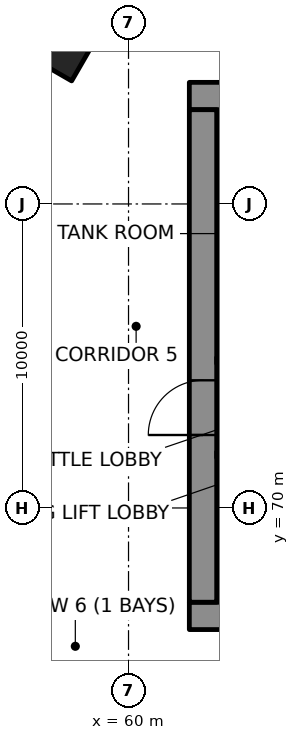
"""IFC4 building model, lengths in metres.
Left out: names, types, materials, properties, quantities, classifications, styles, units other than length and angle.
Written with IfcOpenShell. Run it as: python <this file> out.ifc"""

import sys

from ifc_helpers import new_model, si_unit, direction, frame, frame_2d, origin, origin_2d, place, context, subcontext, project, spatial, polyline, rectangle, outline, extrude, element, fill, save


model = new_model("IFC4")
c1 = context("Model", 3, precision=1e-05, world=origin(), true_north=direction((0.0, 1.0)))
c2 = subcontext(c1, "Body", "Model", "MODEL_VIEW")
j1 = project(units=[si_unit("LENGTHUNIT", "METRE"), si_unit("PLANEANGLEUNIT", "RADIAN")], contexts=[c1])
p1 = place(None, origin())
s1 = spatial("IfcSite", under=j1, at=p1, CompositionType="ELEMENT")
p2 = place(p1, origin())
s2 = spatial("IfcBuilding", under=s1, at=p2, CompositionType="ELEMENT")
p3 = place(p2, frame((0.0, 0.0, -14.0)))
s3 = spatial("IfcBuildingStorey", under=s2, at=p3, CompositionType="ELEMENT", Elevation=-14.0)
p4 = place(p3, frame((67.936, 110.334, -0.35), z_axis=(0.0, 0.0, 1.0), x_axis=(-0.499999089162, -0.866025929656, 0.0)))
e1 = element("IfcWall", 1, at=p4, inside=s3, PredefinedType="SOLIDWALL", context=c2, shape_type="SweptSolid", body=[
    extrude(rectangle(XDim=53.501, YDim=0.6, at=frame_2d((26.751, 0.0))), origin(), (0.0, 0.0, 1.0), 4.5),
])
p5 = place(p3, frame((0.0, 0.0, -14.5)))
e2 = element("IfcWall", 2, at=p5, inside=s3, PredefinedType="SOLIDWALL", context=c2, shape_type="SweptSolid", body=[
    extrude(outline(polyline([(67.936, 110.334), (41.185, 64.0), (40.723, 64.8), (67.474, 111.134), (67.936, 110.334)])), origin(), (0.0, 0.0, 1.0), 14.15),
])
p6 = place(p3, frame((57.78, 84.942, -0.35), z_axis=(0.0, 0.0, 1.0), x_axis=(-0.5, -0.866025403784, 0.0)))
e3 = element("IfcColumn", 3, at=p6, inside=s3, PredefinedType="COLUMN", context=c2, shape_type="SweptSolid", body=[
    extrude(rectangle(XDim=1.2, YDim=1.5, at=origin_2d()), origin(), (0.0, 0.0, 1.0), 4.85),
])
p7 = place(p3, frame((62.0, 66.45, -0.35), z_axis=(0.0, 0.0, 1.0), x_axis=(1.0, 0.0, 0.0)))
e4 = element("IfcWall", 4, at=p7, inside=s3, PredefinedType="SHEAR", context=c2, shape_type="SweptSolid", body=[
    extrude(rectangle(XDim=26.0, YDim=0.9, at=frame_2d((13.0, 0.0))), origin(), (0.0, 0.0, 1.0), 4.5),
])
p8 = place(p7, frame((3.45, 0.0, 0.35)))
e5 = element("IfcOpeningElement", 5, at=p8, cuts=e4, PredefinedType="OPENING", context=c2, shape_type="SweptSolid", body=[
    extrude(rectangle(XDim=0.9, YDim=2.1, at=frame_2d((0.45, 1.05))), frame((0.0, 0.46, 0.0), z_axis=(0.0, -1.0, 0.0), x_axis=(1.0, 0.0, 0.0)), (0.0, 0.0, 1.0), 0.92),
])
p9 = place(p7, frame((5.637, 0.0, 0.35)))
e6 = element("IfcOpeningElement", 6, at=p9, cuts=e4, PredefinedType="OPENING", context=c2, shape_type="SweptSolid", body=[
    extrude(rectangle(XDim=0.9, YDim=2.1, at=frame_2d((0.45, 1.05))), frame((0.0, 0.46, 0.0), z_axis=(0.0, -1.0, 0.0), x_axis=(1.0, 0.0, 0.0)), (0.0, 0.0, 1.0), 0.92),
])
p10 = place(p7, frame((7.212, 0.0, 0.35)))
e7 = element("IfcOpeningElement", 7, at=p10, cuts=e4, PredefinedType="OPENING", context=c2, shape_type="SweptSolid", body=[
    extrude(rectangle(XDim=0.9, YDim=2.1, at=frame_2d((0.45, 1.05))), frame((0.0, 0.46, 0.0), z_axis=(0.0, -1.0, 0.0), x_axis=(1.0, 0.0, 0.0)), (0.0, 0.0, 1.0), 0.92),
])
p11 = place(p7, frame((8.999, 0.0, 0.35)))
e8 = element("IfcOpeningElement", 8, at=p11, cuts=e4, PredefinedType="OPENING", context=c2, shape_type="SweptSolid", body=[
    extrude(rectangle(XDim=0.9, YDim=2.1, at=frame_2d((0.45, 1.05))), frame((0.0, 0.46, 0.0), z_axis=(0.0, -1.0, 0.0), x_axis=(1.0, 0.0, 0.0)), (0.0, 0.0, 1.0), 0.92),
])
p12 = place(p7, frame((17.324, 0.0, 0.35)))
e9 = element("IfcOpeningElement", 9, at=p12, cuts=e4, PredefinedType="OPENING", context=c2, shape_type="SweptSolid", body=[
    extrude(rectangle(XDim=0.9, YDim=2.1, at=frame_2d((0.45, 1.05))), frame((0.0, 0.46, 0.0), z_axis=(0.0, -1.0, 0.0), x_axis=(1.0, 0.0, 0.0)), (0.0, 0.0, 1.0), 0.92),
])
p13 = place(p3, frame((62.0, 83.55, -0.35), z_axis=(0.0, 0.0, 1.0), x_axis=(1.0, 0.0, 0.0)))
e10 = element("IfcWall", 10, at=p13, inside=s3, PredefinedType="SHEAR", context=c2, shape_type="SweptSolid", body=[
    extrude(rectangle(XDim=26.0, YDim=0.9, at=frame_2d((13.0, 0.0))), origin(), (0.0, 0.0, 1.0), 4.5),
])
p14 = place(p13, frame((5.695, 0.0, 0.35)))
e11 = element("IfcOpeningElement", 11, at=p14, cuts=e10, PredefinedType="OPENING", context=c2, shape_type="SweptSolid", body=[
    extrude(rectangle(XDim=1.0, YDim=2.1, at=frame_2d((0.5, 1.05))), frame((0.0, 0.46, 0.0), z_axis=(0.0, -1.0, 0.0), x_axis=(1.0, 0.0, 0.0)), (0.0, 0.0, 1.0), 0.92),
])
p15 = place(p13, frame((19.505, 0.0, 0.35)))
e12 = element("IfcOpeningElement", 12, at=p15, cuts=e10, PredefinedType="OPENING", context=c2, shape_type="SweptSolid", body=[
    extrude(rectangle(XDim=1.0, YDim=2.1, at=frame_2d((0.5, 1.05))), frame((0.0, 0.46, 0.0), z_axis=(0.0, -1.0, 0.0), x_axis=(1.0, 0.0, 0.0)), (0.0, 0.0, 1.0), 0.92),
])
p16 = place(p13, frame((3.45, 0.0, 0.35)))
e13 = element("IfcOpeningElement", 13, at=p16, cuts=e10, PredefinedType="OPENING", context=c2, shape_type="SweptSolid", body=[
    extrude(rectangle(XDim=0.9, YDim=2.1, at=frame_2d((0.45, 1.05))), frame((0.0, 0.46, 0.0), z_axis=(0.0, -1.0, 0.0), x_axis=(1.0, 0.0, 0.0)), (0.0, 0.0, 1.0), 0.92),
])
p17 = place(p13, frame((12.65, 0.0, 0.35)))
e14 = element("IfcOpeningElement", 14, at=p17, cuts=e10, PredefinedType="OPENING", context=c2, shape_type="SweptSolid", body=[
    extrude(rectangle(XDim=0.9, YDim=2.1, at=frame_2d((0.45, 1.05))), frame((0.0, 0.46, 0.0), z_axis=(0.0, -1.0, 0.0), x_axis=(1.0, 0.0, 0.0)), (0.0, 0.0, 1.0), 0.92),
])
p18 = place(p13, frame((22.55, 0.0, 0.35)))
e15 = element("IfcOpeningElement", 15, at=p18, cuts=e10, PredefinedType="OPENING", context=c2, shape_type="SweptSolid", body=[
    extrude(rectangle(XDim=0.9, YDim=2.1, at=frame_2d((0.45, 1.05))), frame((0.0, 0.46, 0.0), z_axis=(0.0, -1.0, 0.0), x_axis=(1.0, 0.0, 0.0)), (0.0, 0.0, 1.0), 0.92),
])
p19 = place(p3, frame((62.45, 66.9, -0.35), z_axis=(0.0, 0.0, 1.0), x_axis=(0.0, 1.0, 0.0)))
e16 = element("IfcWall", 16, at=p19, inside=s3, PredefinedType="SHEAR", context=c2, shape_type="SweptSolid", body=[
    extrude(rectangle(XDim=16.2, YDim=0.9, at=frame_2d((8.1, 0.0))), origin(), (0.0, 0.0, 1.0), 4.5),
])
p20 = place(p19, frame((5.5, 0.0, 0.35)))
e17 = element("IfcOpeningElement", 17, at=p20, cuts=e16, PredefinedType="OPENING", context=c2, shape_type="SweptSolid", body=[
    extrude(rectangle(XDim=1.8, YDim=2.1, at=frame_2d((0.9, 1.05))), frame((0.0, 0.46, 0.0), z_axis=(0.0, -1.0, 0.0), x_axis=(1.0, 0.0, 0.0)), (0.0, 0.0, 1.0), 0.92),
])
p21 = place(p3, frame((62.9, 71.75, 0.0), z_axis=(0.0, 0.0, 1.0), x_axis=(1.0, 0.0, 0.0)))
e18 = element("IfcWall", 18, at=p21, inside=s3, PredefinedType="PARTITIONING", context=c2, shape_type="SweptSolid", body=[
    extrude(rectangle(XDim=7.4, YDim=0.2, at=frame_2d((3.7, 0.0))), origin(), (0.0, 0.0, 1.0), 4.15),
])
p22 = place(p3, frame((62.9, 74.85, 0.0), z_axis=(0.0, 0.0, 1.0), x_axis=(1.0, 0.0, 0.0)))
e19 = element("IfcWall", 19, at=p22, inside=s3, PredefinedType="PARTITIONING", context=c2, shape_type="SweptSolid", body=[
    extrude(rectangle(XDim=4.3, YDim=0.2, at=frame_2d((2.15, 0.0))), origin(), (0.0, 0.0, 1.0), 4.15),
])
p23 = place(p20, origin())
e20 = element("IfcDoor", 20, at=p23, inside=s3, OperationType="SINGLE_SWING_LEFT", PredefinedType="DOOR", context=c2, shape_type="SweptSolid", body=[
    extrude(rectangle(XDim=1.8, YDim=2.1, at=frame_2d((0.9, 1.05))), frame((0.0, 0.17, 0.0), z_axis=(0.0, -1.0, 0.0), x_axis=(1.0, 0.0, 0.0)), (0.0, 0.0, 1.0), 0.34),
])
fill(e17, e20)
save(model, sys.argv[1])
